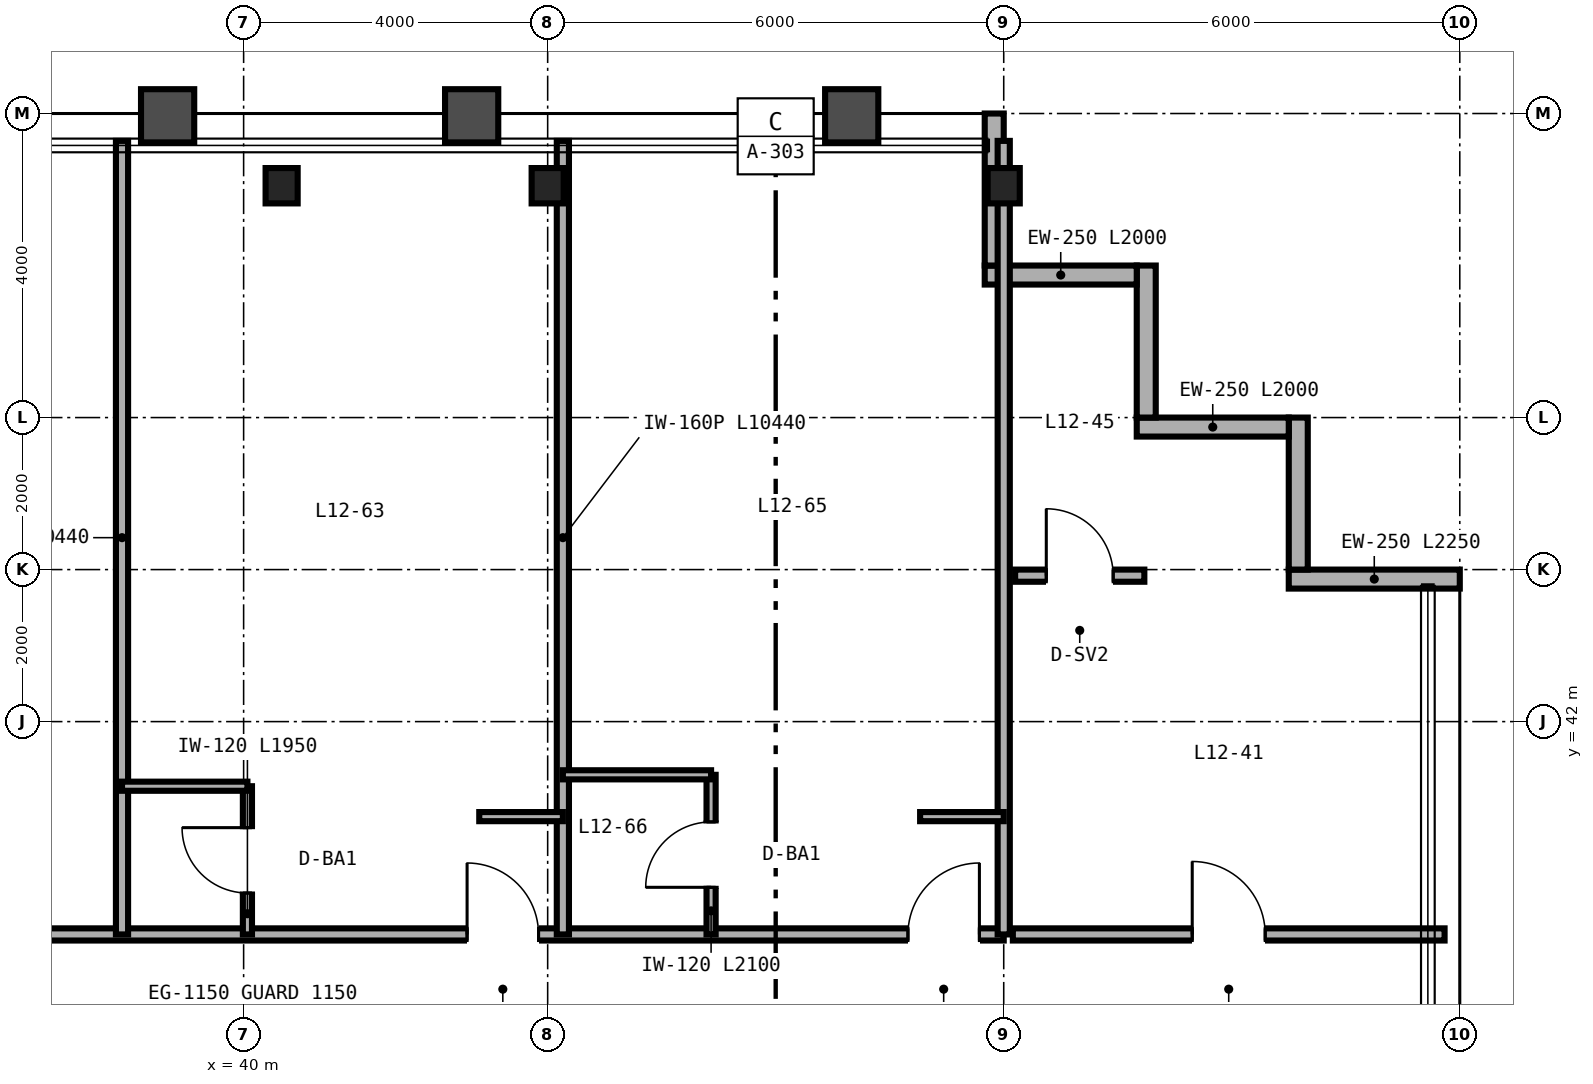
"""IFC4 building model, lengths in metres.
Left out: names, types, materials, properties, quantities, classifications, styles, units other than length and angle.
Written with IfcOpenShell. Run it as: python <this file> out.ifc"""

import sys

from ifc_helpers import new_model, si_unit, direction, frame, frame_2d, origin, origin_2d, place, context, subcontext, project, spatial, rectangle, i_section, extrude, source, transform, mapped, element, fill, save


model = new_model("IFC4")
c1 = context("Model", 3, precision=1e-05, world=origin(), true_north=direction((0.0, 1.0)))
c2 = subcontext(c1, "Body", "Model", "MODEL_VIEW")
j1 = project(units=[si_unit("LENGTHUNIT", "METRE"), si_unit("PLANEANGLEUNIT", "RADIAN")], contexts=[c1])
p1 = place(None, origin())
s1 = spatial("IfcSite", under=j1, at=p1, CompositionType="ELEMENT")
p2 = place(p1, origin())
s2 = spatial("IfcBuilding", under=s1, at=p2, CompositionType="ELEMENT")
p3 = place(p2, frame((0.0, 0.0, 52.8)))
s3 = spatial("IfcBuildingStorey", under=s2, at=p3, CompositionType="ELEMENT", Elevation=52.8)
m1 = source(origin(), c2, "Body", "SweptSolid", [
    extrude(i_section(OverallWidth=0.422, OverallDepth=0.465, WebThickness=0.045, FlangeThickness=0.073, FilletRadius=0.025, at=origin_2d()), origin(), (0.0, 0.0, 1.0), 3.35),
])
for number, where, z_axis, x_axis in (
    (1, (40.5, 49.05, 0.0), (0.0, 0.0, 1.0), (1.0, 0.0, 0.0)),
    (2, (44.0, 49.05, 0.0), (0.0, 0.0, 1.0), (1.0, 0.0, 0.0)),
    (3, (50.0, 49.05, 0.0), (0.0, 0.0, 1.0), (1.0, 0.0, 0.0)),
):
    element("IfcColumn", number, at=place(p3, frame(where, z_axis=z_axis, x_axis=x_axis)), inside=s3, PredefinedType="COLUMN", context=c2, shape_type="MappedRepresentation", body=[
        mapped(m1, transform((0.0, 0.0, 0.0), scale=1.0)),
    ])
p4 = place(p3, frame((56.0, 43.875, 0.0), z_axis=(0.0, 0.0, 1.0), x_axis=(-1.0, 0.0, 0.0)))
e4 = element("IfcWall", 4, at=p4, inside=s3, PredefinedType="SOLIDWALL", context=c2, shape_type="SweptSolid", body=[
    extrude(rectangle(XDim=2.25, YDim=0.25, at=frame_2d((1.125, 0.0))), origin(), (0.0, 0.0, 1.0), 3.35),
])
for number, where, z_axis, x_axis in (
    (5, (53.875, 44.0, 0.0), (0.0, 0.0, 1.0), (0.0, 1.0, 0.0)),
    (6, (53.75, 45.875, 0.0), (0.0, 0.0, 1.0), (-1.0, 0.0, 0.0)),
    (7, (51.875, 46.0, 0.0), (0.0, 0.0, 1.0), (0.0, 1.0, 0.0)),
    (8, (51.75, 47.875, 0.0), (0.0, 0.0, 1.0), (-1.0, 0.0, 0.0)),
):
    element("IfcWall", number, at=place(p3, frame(where, z_axis=z_axis, x_axis=x_axis)), inside=s3, PredefinedType="SOLIDWALL", context=c2, shape_type="SweptSolid", body=[
        extrude(rectangle(XDim=2.0, YDim=0.25, at=frame_2d((1.0, 0.0))), origin(), (0.0, 0.0, 1.0), 3.35),
    ])
p5 = place(p3, frame((49.875, 48.0, 0.0), z_axis=(0.0, 0.0, 1.0), x_axis=(0.0, 1.0, 0.0)))
e9 = element("IfcWall", 9, at=p5, inside=s3, PredefinedType="SOLIDWALL", context=c2, shape_type="SweptSolid", body=[
    extrude(rectangle(XDim=2.0, YDim=0.25, at=frame_2d((1.0, 0.0))), origin(), (0.0, 0.0, 1.0), 2.657),
])
p6 = place(p3, frame((50.12, 39.2, 0.0), z_axis=(0.0, 0.0, 1.0), x_axis=(1.0, 0.0, 0.0)))
e10 = element("IfcWall", 10, at=p6, inside=s3, PredefinedType="PARTITIONING", context=c2, shape_type="SweptSolid", body=[
    extrude(rectangle(XDim=5.68, YDim=0.16, at=frame_2d((2.84, 0.0))), origin(), (0.0, 0.0, 1.0), 3.35),
])
p7 = place(p6, frame((2.36, 0.0, 0.0)))
e11 = element("IfcOpeningElement", 11, at=p7, cuts=e10, PredefinedType="OPENING", context=c2, shape_type="SweptSolid", body=[
    extrude(rectangle(XDim=0.96, YDim=2.15, at=frame_2d((0.48, 1.075))), frame((0.0, 0.09, 0.0), z_axis=(0.0, -1.0, 0.0), x_axis=(1.0, 0.0, 0.0)), (0.0, 0.0, 1.0), 0.18),
])
p8 = place(p3, frame((50.15, 43.92, 0.0), z_axis=(0.0, 0.0, 1.0), x_axis=(1.0, 0.0, 0.0)))
e12 = element("IfcWall", 12, at=p8, inside=s3, PredefinedType="PARTITIONING", context=c2, shape_type="SweptSolid", body=[
    extrude(rectangle(XDim=1.7, YDim=0.16, at=frame_2d((0.85, 0.0))), origin(), (0.0, 0.0, 1.0), 3.35),
])
p9 = place(p8, frame((0.41, 0.0, 0.0)))
e13 = element("IfcOpeningElement", 13, at=p9, cuts=e12, PredefinedType="OPENING", context=c2, shape_type="SweptSolid", body=[
    extrude(rectangle(XDim=0.88, YDim=2.15, at=frame_2d((0.44, 1.075))), frame((0.0, 0.09, 0.0), z_axis=(0.0, -1.0, 0.0), x_axis=(1.0, 0.0, 0.0)), (0.0, 0.0, 1.0), 0.18),
])
p10 = place(p3, frame((14.0, 39.2, 0.0), z_axis=(0.0, 0.0, 1.0), x_axis=(1.0, 0.0, 0.0)))
e14 = element("IfcWall", 14, at=p10, inside=s3, PredefinedType="PARTITIONING", context=c2, shape_type="SweptSolid", body=[
    extrude(rectangle(XDim=36.0, YDim=0.16, at=frame_2d((18.0, 0.0))), origin(), (0.0, 0.0, 1.0), 2.571),
])
p11 = place(p10, frame((4.54, 0.0, 0.0)))
e15 = element("IfcOpeningElement", 15, at=p11, cuts=e14, PredefinedType="OPENING", context=c2, shape_type="SweptSolid", body=[
    extrude(rectangle(XDim=0.94, YDim=2.15, at=frame_2d((0.47, 1.075))), frame((0.0, 0.09, 0.0), z_axis=(0.0, -1.0, 0.0), x_axis=(1.0, 0.0, 0.0)), (0.0, 0.0, 1.0), 0.18),
])
p12 = place(p10, frame((10.29, 0.0, 0.0)))
e16 = element("IfcOpeningElement", 16, at=p12, cuts=e14, PredefinedType="OPENING", context=c2, shape_type="SweptSolid", body=[
    extrude(rectangle(XDim=0.94, YDim=2.15, at=frame_2d((0.47, 1.075))), frame((0.0, 0.09, 0.0), z_axis=(0.0, -1.0, 0.0), x_axis=(1.0, 0.0, 0.0)), (0.0, 0.0, 1.0), 0.18),
])
p13 = place(p10, frame((16.54, 0.0, 0.0)))
e17 = element("IfcOpeningElement", 17, at=p13, cuts=e14, PredefinedType="OPENING", context=c2, shape_type="SweptSolid", body=[
    extrude(rectangle(XDim=0.94, YDim=2.15, at=frame_2d((0.47, 1.075))), frame((0.0, 0.09, 0.0), z_axis=(0.0, -1.0, 0.0), x_axis=(1.0, 0.0, 0.0)), (0.0, 0.0, 1.0), 0.18),
])
p14 = place(p10, frame((20.62, 0.0, 0.0)))
e18 = element("IfcOpeningElement", 18, at=p14, cuts=e14, PredefinedType="OPENING", context=c2, shape_type="SweptSolid", body=[
    extrude(rectangle(XDim=0.96, YDim=2.15, at=frame_2d((0.48, 1.075))), frame((0.0, 0.09, 0.0), z_axis=(0.0, -1.0, 0.0), x_axis=(1.0, 0.0, 0.0)), (0.0, 0.0, 1.0), 0.18),
])
p15 = place(p10, frame((28.94, 0.0, 0.0)))
e19 = element("IfcOpeningElement", 19, at=p15, cuts=e14, PredefinedType="OPENING", context=c2, shape_type="SweptSolid", body=[
    extrude(rectangle(XDim=0.94, YDim=2.15, at=frame_2d((0.47, 1.075))), frame((0.0, 0.09, 0.0), z_axis=(0.0, -1.0, 0.0), x_axis=(1.0, 0.0, 0.0)), (0.0, 0.0, 1.0), 0.18),
])
p16 = place(p10, frame((34.74, 0.0, 0.0)))
e20 = element("IfcOpeningElement", 20, at=p16, cuts=e14, PredefinedType="OPENING", context=c2, shape_type="SweptSolid", body=[
    extrude(rectangle(XDim=0.94, YDim=2.15, at=frame_2d((0.47, 1.075))), frame((0.0, 0.09, 0.0), z_axis=(0.0, -1.0, 0.0), x_axis=(1.0, 0.0, 0.0)), (0.0, 0.0, 1.0), 0.18),
])
p17 = place(p3, frame((50.0, 39.2, 0.0), z_axis=(0.0, 0.0, 1.0), x_axis=(0.0, 1.0, 0.0)))
e21 = element("IfcWall", 21, at=p17, inside=s3, PredefinedType="PARTITIONING", context=c2, shape_type="SweptSolid", body=[
    extrude(rectangle(XDim=10.44, YDim=0.16, at=frame_2d((5.22, 0.0))), origin(), (0.0, 0.0, 1.0), 2.657),
])
p18 = place(p3, frame((38.4, 39.2, 0.0), z_axis=(0.0, 0.0, 1.0), x_axis=(0.0, 1.0, 0.0)))
e22 = element("IfcWall", 22, at=p18, inside=s3, PredefinedType="PARTITIONING", context=c2, shape_type="SweptSolid", body=[
    extrude(rectangle(XDim=10.44, YDim=0.16, at=frame_2d((5.22, 0.0))), origin(), (0.0, 0.0, 1.0), 2.423),
])
p19 = place(p3, frame((44.2, 39.2, 0.0), z_axis=(0.0, 0.0, 1.0), x_axis=(0.0, 1.0, 0.0)))
e23 = element("IfcWall", 23, at=p19, inside=s3, PredefinedType="PARTITIONING", context=c2, shape_type="SweptSolid", body=[
    extrude(rectangle(XDim=10.44, YDim=0.16, at=frame_2d((5.22, 0.0))), origin(), (0.0, 0.0, 1.0), 2.657),
])
p20 = place(p3, frame((40.05, 39.2, 0.0), z_axis=(0.0, 0.0, 1.0), x_axis=(0.0, 1.0, 0.0)))
e24 = element("IfcWall", 24, at=p20, inside=s3, PredefinedType="PARTITIONING", context=c2, shape_type="SweptSolid", body=[
    extrude(rectangle(XDim=1.95, YDim=0.12, at=frame_2d((0.975, 0.0))), origin(), (0.0, 0.0, 1.0), 3.35),
])
p21 = place(p20, frame((0.545, 0.0, 0.0)))
e25 = element("IfcOpeningElement", 25, at=p21, cuts=e24, PredefinedType="OPENING", context=c2, shape_type="SweptSolid", body=[
    extrude(rectangle(XDim=0.86, YDim=2.1, at=frame_2d((0.43, 1.05))), frame((0.0, 0.07, 0.0), z_axis=(0.0, -1.0, 0.0), x_axis=(1.0, 0.0, 0.0)), (0.0, 0.0, 1.0), 0.14),
])
p22 = place(p3, frame((38.4, 41.15, 0.0), z_axis=(0.0, 0.0, 1.0), x_axis=(1.0, 0.0, 0.0)))
e26 = element("IfcWall", 26, at=p22, inside=s3, PredefinedType="PARTITIONING", context=c2, shape_type="SweptSolid", body=[
    extrude(rectangle(XDim=1.65, YDim=0.12, at=frame_2d((0.825, 0.0))), origin(), (0.0, 0.0, 1.0), 3.35),
])
p23 = place(p3, frame((43.1, 40.75, 0.0), z_axis=(0.0, 0.0, 1.0), x_axis=(1.0, 0.0, 0.0)))
e27 = element("IfcWall", 27, at=p23, inside=s3, PredefinedType="PARTITIONING", context=c2, shape_type="SweptSolid", body=[
    extrude(rectangle(XDim=1.1, YDim=0.12, at=frame_2d((0.55, 0.0))), origin(), (0.0, 0.0, 1.0), 3.35),
])
p24 = place(p3, frame((46.15, 39.2, 0.0), z_axis=(0.0, 0.0, 1.0), x_axis=(0.0, 1.0, 0.0)))
e28 = element("IfcWall", 28, at=p24, inside=s3, PredefinedType="PARTITIONING", context=c2, shape_type="SweptSolid", body=[
    extrude(rectangle(XDim=2.1, YDim=0.12, at=frame_2d((1.05, 0.0))), origin(), (0.0, 0.0, 1.0), 3.35),
])
p25 = place(p24, frame((0.62, 0.0, 0.0)))
e29 = element("IfcOpeningElement", 29, at=p25, cuts=e28, PredefinedType="OPENING", context=c2, shape_type="SweptSolid", body=[
    extrude(rectangle(XDim=0.86, YDim=2.1, at=frame_2d((0.43, 1.05))), frame((0.0, 0.07, 0.0), z_axis=(0.0, -1.0, 0.0), x_axis=(1.0, 0.0, 0.0)), (0.0, 0.0, 1.0), 0.14),
])
p26 = place(p3, frame((44.2, 41.3, 0.0), z_axis=(0.0, 0.0, 1.0), x_axis=(1.0, 0.0, 0.0)))
e30 = element("IfcWall", 30, at=p26, inside=s3, PredefinedType="PARTITIONING", context=c2, shape_type="SweptSolid", body=[
    extrude(rectangle(XDim=1.95, YDim=0.12, at=frame_2d((0.975, 0.0))), origin(), (0.0, 0.0, 1.0), 3.35),
])
p27 = place(p3, frame((48.9, 40.75, 0.0), z_axis=(0.0, 0.0, 1.0), x_axis=(1.0, 0.0, 0.0)))
e31 = element("IfcWall", 31, at=p27, inside=s3, PredefinedType="PARTITIONING", context=c2, shape_type="SweptSolid", body=[
    extrude(rectangle(XDim=1.1, YDim=0.12, at=frame_2d((0.55, 0.0))), origin(), (0.0, 0.0, 1.0), 3.35),
])
m2 = source(origin(), c2, "Body", "SweptSolid", [
    extrude(rectangle(XDim=0.96, YDim=2.15, at=frame_2d((0.48, 1.075))), frame((0.0, 0.025, 0.0), z_axis=(0.0, -1.0, 0.0), x_axis=(1.0, 0.0, 0.0)), (0.0, 0.0, 1.0), 0.05),
])
p28 = place(p7, origin())
e32 = element("IfcDoor", 32, at=p28, inside=s3, OperationType="SINGLE_SWING_LEFT", PredefinedType="DOOR", context=c2, shape_type="MappedRepresentation", body=[
    mapped(m2, transform((0.0, 0.0, 0.0), scale=1.0)),
])
fill(e11, e32)
m3 = source(origin(), c2, "Body", "SweptSolid", [
    extrude(rectangle(XDim=0.88, YDim=2.15, at=frame_2d((0.44, 1.075))), frame((0.0, 0.025, 0.0), z_axis=(0.0, -1.0, 0.0), x_axis=(1.0, 0.0, 0.0)), (0.0, 0.0, 1.0), 0.05),
])
p29 = place(p9, origin())
e33 = element("IfcDoor", 33, at=p29, inside=s3, OperationType="SINGLE_SWING_LEFT", PredefinedType="DOOR", context=c2, shape_type="MappedRepresentation", body=[
    mapped(m3, transform((0.0, 0.0, 0.0), scale=1.0)),
])
fill(e13, e33)
m4 = source(origin(), c2, "Body", "SweptSolid", [
    extrude(rectangle(XDim=0.86, YDim=2.1, at=frame_2d((0.43, 1.05))), frame((0.0, 0.025, 0.0), z_axis=(0.0, -1.0, 0.0), x_axis=(1.0, 0.0, 0.0)), (0.0, 0.0, 1.0), 0.05),
])
p30 = place(p21, origin())
e34 = element("IfcDoor", 34, at=p30, inside=s3, OperationType="SINGLE_SWING_RIGHT", PredefinedType="DOOR", context=c2, shape_type="MappedRepresentation", body=[
    mapped(m4, transform((0.0, 0.0, 0.0), scale=1.0)),
])
fill(e25, e34)
p31 = place(p25, origin())
e35 = element("IfcDoor", 35, at=p31, inside=s3, OperationType="SINGLE_SWING_LEFT", PredefinedType="DOOR", context=c2, shape_type="MappedRepresentation", body=[
    mapped(m4, transform((0.0, 0.0, 0.0), scale=1.0)),
])
fill(e29, e35)
m5 = source(origin(), c2, "Body", "SweptSolid", [
    extrude(rectangle(XDim=0.94, YDim=2.15, at=frame_2d((0.47, 1.075))), frame((0.0, 0.025, 0.0), z_axis=(0.0, -1.0, 0.0), x_axis=(1.0, 0.0, 0.0)), (0.0, 0.0, 1.0), 0.05),
])
p32 = place(p15, origin())
e36 = element("IfcDoor", 36, at=p32, inside=s3, OperationType="SINGLE_SWING_LEFT", PredefinedType="DOOR", context=c2, shape_type="MappedRepresentation", body=[
    mapped(m5, transform((0.0, 0.0, 0.0), scale=1.0)),
])
fill(e19, e36)
p33 = place(p16, origin())
e37 = element("IfcDoor", 37, at=p33, inside=s3, OperationType="SINGLE_SWING_RIGHT", PredefinedType="DOOR", context=c2, shape_type="MappedRepresentation", body=[
    mapped(m5, transform((0.0, 0.0, 0.0), scale=1.0)),
])
fill(e20, e37)
save(model, sys.argv[1])
